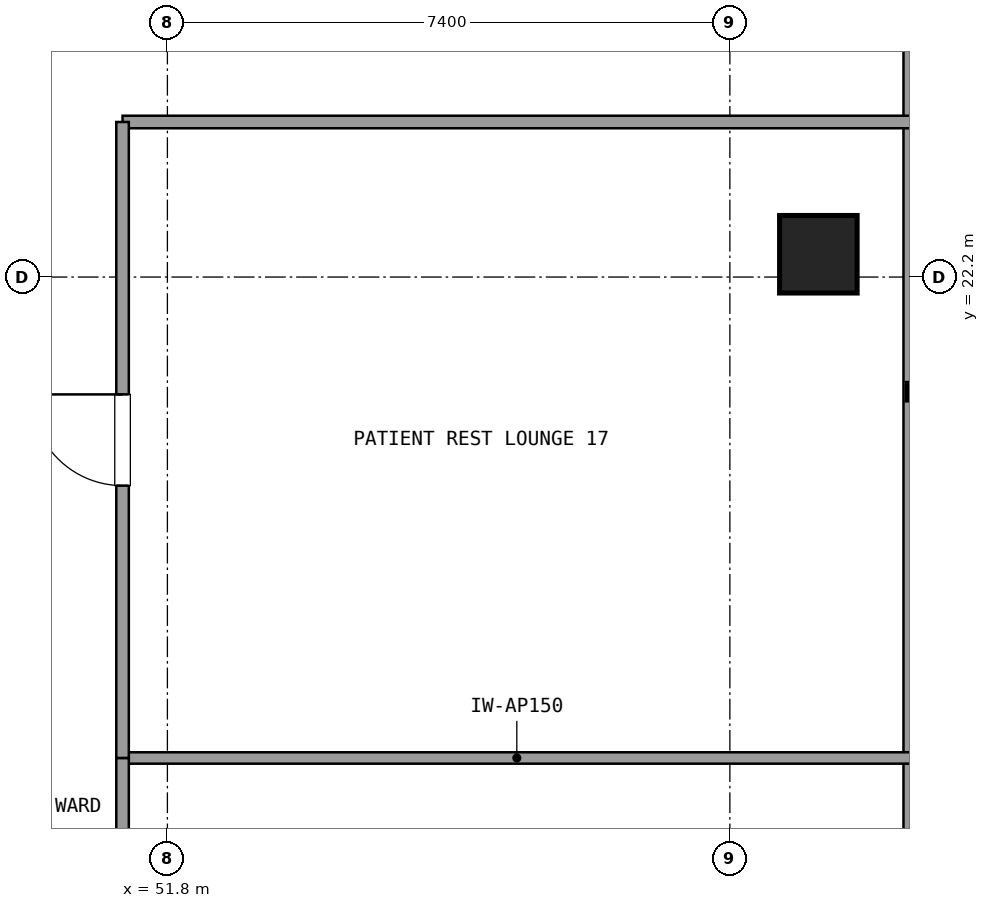
"""IFC4 building model, lengths in metres.
Left out: names, types, materials, properties, quantities, classifications, styles, units other than length and angle.
Written with IfcOpenShell. Run it as: python <this file> out.ifc"""

import sys

from ifc_helpers import new_model, si_unit, direction, frame, frame_2d, origin, origin_2d, place, context, subcontext, project, spatial, rectangle, extrude, element, fill, save


model = new_model("IFC4")
c1 = context("Model", 3, precision=1e-05, world=origin(), true_north=direction((0.0, 1.0)))
c2 = subcontext(c1, "Body", "Model", "MODEL_VIEW")
j1 = project(units=[si_unit("LENGTHUNIT", "METRE"), si_unit("PLANEANGLEUNIT", "RADIAN")], contexts=[c1])
p1 = place(None, origin())
s1 = spatial("IfcSite", under=j1, at=p1, CompositionType="ELEMENT")
p2 = place(p1, origin())
s2 = spatial("IfcBuilding", under=s1, at=p2, CompositionType="ELEMENT")
p3 = place(p2, frame((0.0, 0.0, 113.58)))
s3 = spatial("IfcBuildingStorey", under=s2, at=p3, CompositionType="ELEMENT", Elevation=113.58)
p4 = place(p3, frame((60.364, 22.5, 0.021), z_axis=(-0.084578849141, 0.0, 0.99641678944), x_axis=(0.0, -1.0, 0.0)))
e1 = element("IfcColumn", 1, at=p4, inside=s3, PredefinedType="COLUMN", context=c2, shape_type="SweptSolid", body=[
    extrude(rectangle(XDim=1.02, YDim=1.02, at=origin_2d()), origin(), (0.0, 0.0, 1.0), 3.571),
])
p5 = place(p3, frame((61.604, 10.275, 0.0), z_axis=(0.0, 0.0, 1.0), x_axis=(0.0, 1.0, 0.0)))
e2 = element("IfcWall", 2, at=p5, inside=s3, PredefinedType="SOLIDWALL", context=c2, shape_type="SweptSolid", body=[
    extrude(rectangle(XDim=31.25, YDim=0.24, at=frame_2d((15.625, 0.0))), origin(), (0.0, 0.0, 1.0), 0.85),
])
p6 = place(p3, frame((51.21, 24.24, 0.0), z_axis=(0.0, 0.0, 1.0), x_axis=(1.0, 0.0, 0.0)))
e3 = element("IfcWall", 3, at=p6, inside=s3, PredefinedType="PARTITIONING", context=c2, shape_type="SweptSolid", body=[
    extrude(rectangle(XDim=10.374, YDim=0.165, at=frame_2d((5.187, 0.0))), origin(), (0.0, 0.0, 1.0), 2.61),
])
p7 = place(p3, frame((51.21, 15.873, 0.0), z_axis=(0.0, 0.0, 1.0), x_axis=(1.0, 0.0, 0.0)))
e4 = element("IfcWall", 4, at=p7, inside=s3, PredefinedType="PARTITIONING", context=c2, shape_type="SweptSolid", body=[
    extrude(rectangle(XDim=10.374, YDim=0.15, at=frame_2d((5.187, 0.0))), origin(), (0.0, 0.0, 1.0), 2.61),
])
p8 = place(p3, frame((51.21, 4.319, 0.0), z_axis=(0.0, 0.0, 1.0), x_axis=(0.0, 1.0, 0.0)))
e5 = element("IfcWall", 5, at=p8, inside=s3, PredefinedType="PARTITIONING", context=c2, shape_type="SweptSolid", body=[
    extrude(rectangle(XDim=11.554, YDim=0.165, at=frame_2d((5.777, 0.0))), origin(), (0.0, 0.0, 1.0), 2.61),
])
p9 = place(p8, frame((5.177, 0.0, 0.0)))
e6 = element("IfcOpeningElement", 6, at=p9, cuts=e5, PredefinedType="OPENING", context=c2, shape_type="SweptSolid", body=[
    extrude(rectangle(XDim=1.2, YDim=2.15, at=frame_2d((0.6, 1.075))), frame((0.0, 0.093, 0.0), z_axis=(0.0, -1.0, 0.0), x_axis=(1.0, 0.0, 0.0)), (0.0, 0.0, 1.0), 0.185),
])
p10 = place(p3, frame((51.21, 15.873, 0.0), z_axis=(0.0, 0.0, 1.0), x_axis=(0.0, 1.0, 0.0)))
e7 = element("IfcWall", 7, at=p10, inside=s3, PredefinedType="PARTITIONING", context=c2, shape_type="SweptSolid", body=[
    extrude(rectangle(XDim=8.367, YDim=0.165, at=frame_2d((4.184, 0.0))), origin(), (0.0, 0.0, 1.0), 2.61),
])
p11 = place(p10, frame((3.583, 0.0, 0.0)))
e8 = element("IfcOpeningElement", 8, at=p11, cuts=e7, PredefinedType="OPENING", context=c2, shape_type="SweptSolid", body=[
    extrude(rectangle(XDim=1.2, YDim=2.15, at=frame_2d((0.6, 1.075))), frame((0.0, 0.093, 0.0), z_axis=(0.0, -1.0, 0.0), x_axis=(1.0, 0.0, 0.0)), (0.0, 0.0, 1.0), 0.185),
])
p12 = place(p11, origin())
e9 = element("IfcDoor", 9, at=p12, inside=s3, OperationType="SINGLE_SWING_RIGHT", PredefinedType="DOOR", context=c2, shape_type="SweptSolid", body=[
    extrude(rectangle(XDim=1.2, YDim=2.15, at=frame_2d((0.6, 1.075))), frame((0.0, 0.025, 0.0), z_axis=(0.0, -1.0, 0.0), x_axis=(1.0, 0.0, 0.0)), (0.0, 0.0, 1.0), 0.05),
])
fill(e8, e9)
save(model, sys.argv[1])
